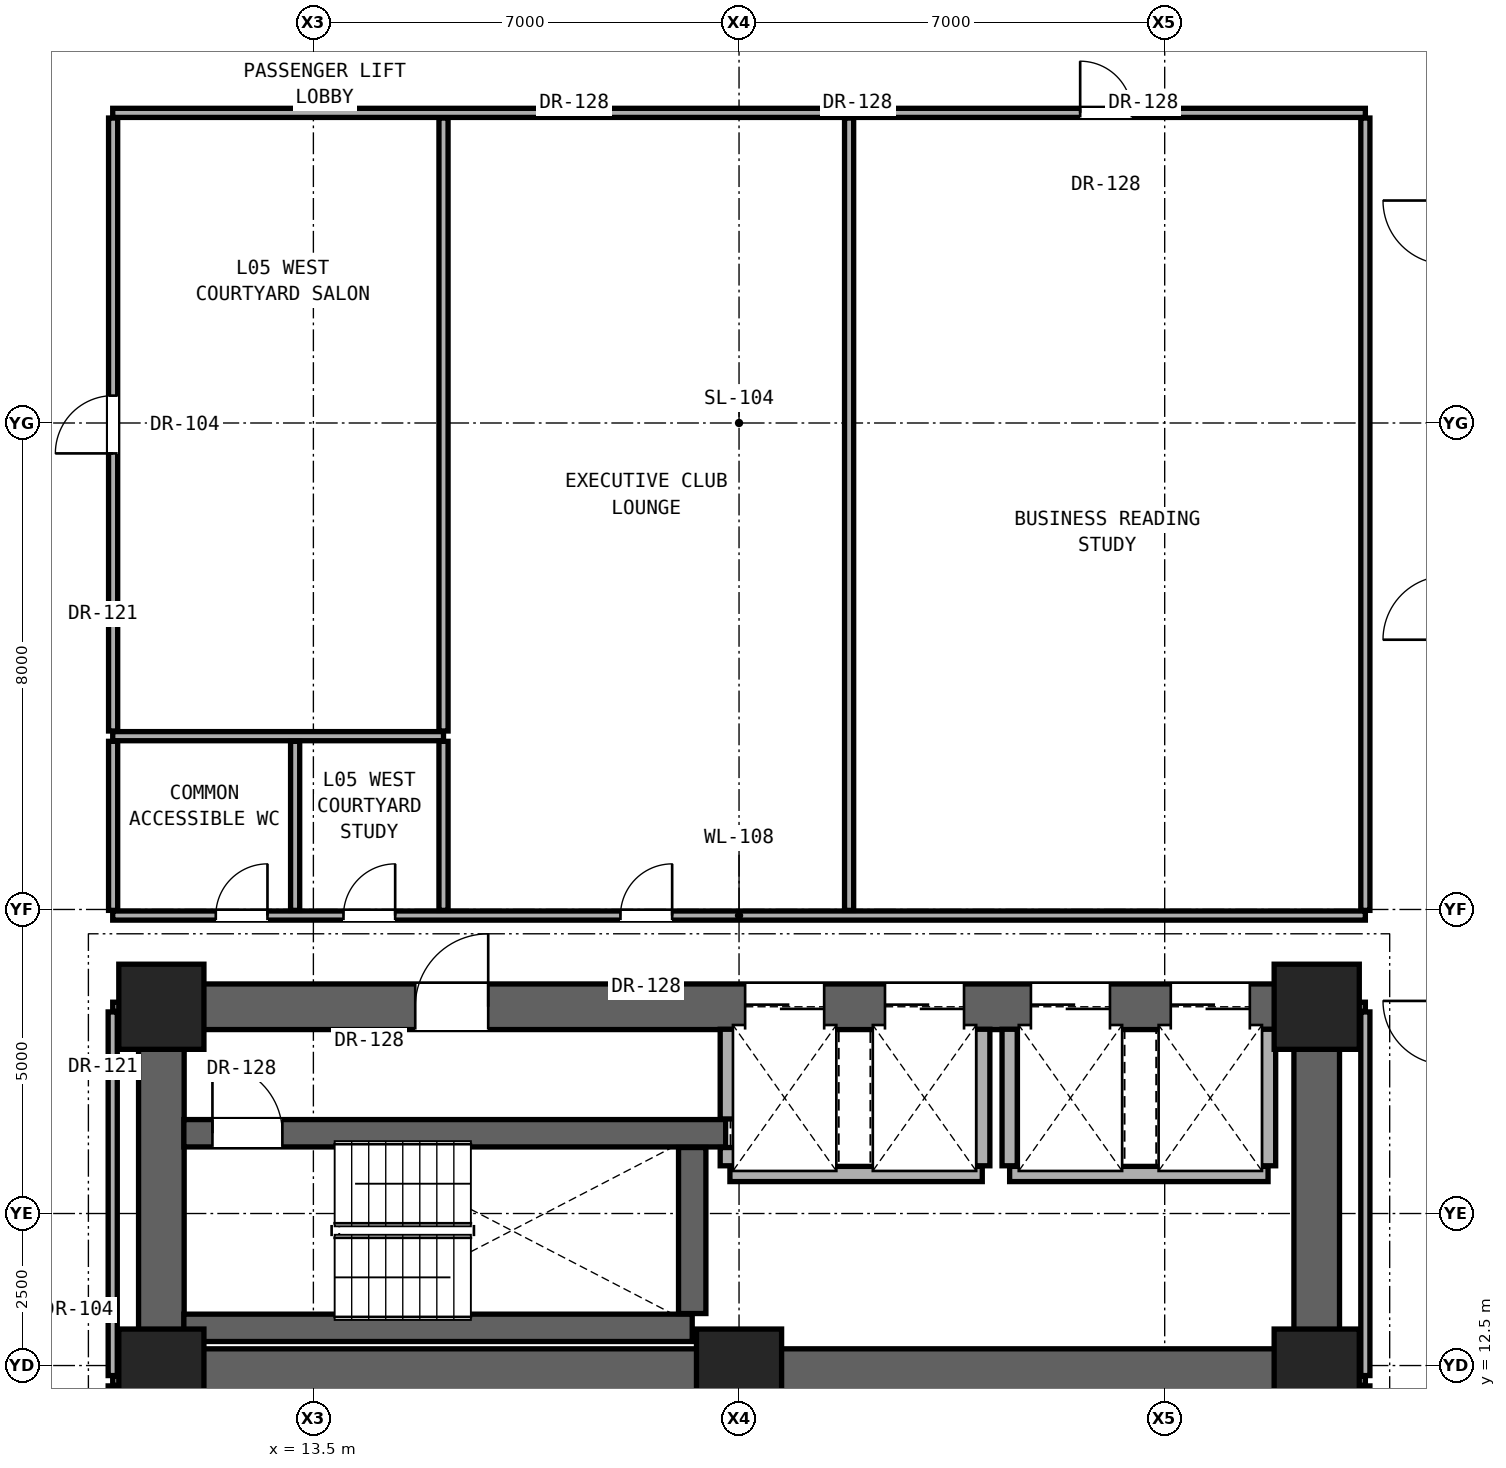
"""IFC4 building model, lengths in metres.
Left out: names, types, materials, properties, quantities, classifications, styles, units other than length and angle.
Written with IfcOpenShell. Run it as: python <this file> out.ifc"""

import sys

from ifc_helpers import new_model, si_unit, direction, frame, frame_2d, origin, origin_2d, place, context, subcontext, project, spatial, rectangle, extrude, element, fill, save


model = new_model("IFC4")
c1 = context("Model", 3, precision=1e-05, world=origin(), true_north=direction((0.0, 1.0)))
c2 = subcontext(c1, "Body", "Model", "MODEL_VIEW")
j1 = project(units=[si_unit("LENGTHUNIT", "METRE"), si_unit("PLANEANGLEUNIT", "RADIAN")], contexts=[c1])
p1 = place(None, origin())
s1 = spatial("IfcSite", under=j1, at=p1, CompositionType="ELEMENT")
p2 = place(p1, origin())
s2 = spatial("IfcBuilding", under=s1, at=p2, CompositionType="ELEMENT")
p3 = place(p2, frame((0.0, 0.0, 22.4)))
s3 = spatial("IfcBuildingStorey", under=s2, at=p3, CompositionType="ELEMENT", Elevation=22.4)
for number, where, z_axis, x_axis in (
    (1, (11.0, 12.4, 0.0), (0.0, 0.0, 1.0), (1.0, 0.0, 0.0)),
    (2, (20.5, 12.4, 0.0), (0.0, 0.0, 1.0), (1.0, 0.0, 0.0)),
    (3, (30.0, 12.4, 0.0), (0.0, 0.0, 1.0), (1.0, 0.0, 0.0)),
    (4, (11.0, 18.4, 0.0), (0.0, 0.0, 1.0), (1.0, 0.0, 0.0)),
    (5, (30.0, 18.4, 0.0), (0.0, 0.0, 1.0), (1.0, 0.0, 0.0)),
):
    element("IfcColumn", number, at=place(p3, frame(where, z_axis=z_axis, x_axis=x_axis)), inside=s3, PredefinedType="COLUMN", context=c2, shape_type="SweptSolid", body=[
        extrude(rectangle(XDim=1.4, YDim=1.4, at=origin_2d()), origin(), (0.0, 0.0, 1.0), 3.3),
    ])
p4 = place(p3, frame((11.0, 12.4, 0.0), z_axis=(0.0, 0.0, 1.0), x_axis=(1.0, 0.0, 0.0)))
e6 = element("IfcWall", 6, at=p4, inside=s3, PredefinedType="SHEAR", context=c2, shape_type="SweptSolid", body=[
    extrude(rectangle(XDim=19.0, YDim=0.75, at=frame_2d((9.5, 0.0))), origin(), (0.0, 0.0, 1.0), 3.06),
])
for number, where, z_axis, x_axis in (
    (7, (11.0, 12.4, 0.0), (0.0, 0.0, 1.0), (0.0, 1.0, 0.0)),
    (8, (30.0, 12.4, 0.0), (0.0, 0.0, 1.0), (0.0, 1.0, 0.0)),
):
    element("IfcWall", number, at=place(p3, frame(where, z_axis=z_axis, x_axis=x_axis)), inside=s3, PredefinedType="SHEAR", context=c2, shape_type="SweptSolid", body=[
        extrude(rectangle(XDim=6.0, YDim=0.75, at=frame_2d((3.0, 0.0))), origin(), (0.0, 0.0, 1.0), 3.06),
    ])
p5 = place(p3, frame((11.0, 18.4, 0.0), z_axis=(0.0, 0.0, 1.0), x_axis=(1.0, 0.0, 0.0)))
e9 = element("IfcWall", 9, at=p5, inside=s3, PredefinedType="SHEAR", context=c2, shape_type="SweptSolid", body=[
    extrude(rectangle(XDim=19.0, YDim=0.75, at=frame_2d((9.5, 0.0))), origin(), (0.0, 0.0, 1.0), 3.06),
])
p6 = place(p5, frame((4.175, 0.0, 0.0)))
e10 = element("IfcOpeningElement", 10, at=p6, cuts=e9, PredefinedType="OPENING", context=c2, shape_type="SweptSolid", body=[
    extrude(rectangle(XDim=1.2, YDim=2.25, at=frame_2d((0.6, 1.125))), frame((0.0, 0.385, 0.0), z_axis=(0.0, -1.0, 0.0), x_axis=(1.0, 0.0, 0.0)), (0.0, 0.0, 1.0), 0.77),
])
p7 = place(p5, frame((9.6, 0.0, 0.0)))
e11 = element("IfcOpeningElement", 11, at=p7, cuts=e9, PredefinedType="OPENING", context=c2, shape_type="SweptSolid", body=[
    extrude(rectangle(XDim=1.3, YDim=2.3, at=frame_2d((0.65, 1.15))), frame((0.0, 0.385, 0.0), z_axis=(0.0, -1.0, 0.0), x_axis=(1.0, 0.0, 0.0)), (0.0, 0.0, 1.0), 0.77),
])
p8 = place(p5, frame((11.9, 0.0, 0.0)))
e12 = element("IfcOpeningElement", 12, at=p8, cuts=e9, PredefinedType="OPENING", context=c2, shape_type="SweptSolid", body=[
    extrude(rectangle(XDim=1.3, YDim=2.3, at=frame_2d((0.65, 1.15))), frame((0.0, 0.385, 0.0), z_axis=(0.0, -1.0, 0.0), x_axis=(1.0, 0.0, 0.0)), (0.0, 0.0, 1.0), 0.77),
])
p9 = place(p5, frame((14.3, 0.0, 0.0)))
e13 = element("IfcOpeningElement", 13, at=p9, cuts=e9, PredefinedType="OPENING", context=c2, shape_type="SweptSolid", body=[
    extrude(rectangle(XDim=1.3, YDim=2.3, at=frame_2d((0.65, 1.15))), frame((0.0, 0.385, 0.0), z_axis=(0.0, -1.0, 0.0), x_axis=(1.0, 0.0, 0.0)), (0.0, 0.0, 1.0), 0.77),
])
p10 = place(p5, frame((16.6, 0.0, 0.0)))
e14 = element("IfcOpeningElement", 14, at=p10, cuts=e9, PredefinedType="OPENING", context=c2, shape_type="SweptSolid", body=[
    extrude(rectangle(XDim=1.3, YDim=2.3, at=frame_2d((0.65, 1.15))), frame((0.0, 0.385, 0.0), z_axis=(0.0, -1.0, 0.0), x_axis=(1.0, 0.0, 0.0)), (0.0, 0.0, 1.0), 0.77),
])
for number, where, z_axis, x_axis in (
    (15, (10.2, 12.25, 0.0), (0.0, 0.0, 1.0), (1.0, 0.0, 0.0)),
    (16, (30.37, 12.25, 0.0), (0.0, 0.0, 1.0), (1.0, 0.0, 0.0)),
):
    element("IfcWall", number, at=place(p3, frame(where, z_axis=z_axis, x_axis=x_axis)), inside=s3, PredefinedType="PARTITIONING", context=c2, shape_type="SweptSolid", body=[
        extrude(rectangle(XDim=0.43, YDim=0.15, at=frame_2d((0.215, 0.0))), origin(), (0.0, 0.0, 1.0), 3.06),
    ])
p11 = place(p3, frame((11.37, 13.12, 0.0), z_axis=(0.0, 0.0, 1.0), x_axis=(1.0, 0.0, 0.0)))
e17 = element("IfcWall", 17, at=p11, inside=s3, PredefinedType="SHEAR", context=c2, shape_type="SweptSolid", body=[
    extrude(rectangle(XDim=8.36, YDim=0.45, at=frame_2d((4.18, 0.0))), origin(), (0.0, 0.0, 1.0), 3.06),
])
p12 = place(p3, frame((20.35, 15.65, 0.0), z_axis=(0.0, 0.0, 1.0), x_axis=(1.0, 0.0, 0.0)))
e18 = element("IfcWall", 18, at=p12, inside=s3, PredefinedType="SOLIDWALL", context=c2, shape_type="SweptSolid", body=[
    extrude(rectangle(XDim=4.15, YDim=0.25, at=frame_2d((2.075, 0.0))), origin(), (0.0, 0.0, 1.0), 3.06),
])
p13 = place(p3, frame((24.95, 15.65, 0.0), z_axis=(0.0, 0.0, 1.0), x_axis=(1.0, 0.0, 0.0)))
e19 = element("IfcWall", 19, at=p13, inside=s3, PredefinedType="SOLIDWALL", context=c2, shape_type="SweptSolid", body=[
    extrude(rectangle(XDim=4.25, YDim=0.25, at=frame_2d((2.125, 0.0))), origin(), (0.0, 0.0, 1.0), 3.06),
])
p14 = place(p3, frame((11.37, 16.32, 0.0), z_axis=(0.0, 0.0, 1.0), x_axis=(1.0, 0.0, 0.0)))
e20 = element("IfcWall", 20, at=p14, inside=s3, PredefinedType="SHEAR", context=c2, shape_type="SweptSolid", body=[
    extrude(rectangle(XDim=8.91, YDim=0.45, at=frame_2d((4.455, 0.0))), origin(), (0.0, 0.0, 1.0), 3.06),
])
p15 = place(p14, frame((0.47, 0.0, 0.0)))
e21 = element("IfcOpeningElement", 21, at=p15, cuts=e20, PredefinedType="OPENING", context=c2, shape_type="SweptSolid", body=[
    extrude(rectangle(XDim=1.15, YDim=2.2, at=frame_2d((0.575, 1.1))), frame((0.0, 0.235, 0.0), z_axis=(0.0, -1.0, 0.0), x_axis=(1.0, 0.0, 0.0)), (0.0, 0.0, 1.0), 0.47),
])
for number, where, z_axis, x_axis in (
    (22, (10.2, 18.4, 0.0), (0.0, 0.0, 1.0), (1.0, 0.0, 0.0)),
    (23, (30.37, 18.4, 0.0), (0.0, 0.0, 1.0), (1.0, 0.0, 0.0)),
):
    element("IfcWall", number, at=place(p3, frame(where, z_axis=z_axis, x_axis=x_axis)), inside=s3, PredefinedType="PARTITIONING", context=c2, shape_type="SweptSolid", body=[
        extrude(rectangle(XDim=0.43, YDim=0.15, at=frame_2d((0.215, 0.0))), origin(), (0.0, 0.0, 1.0), 2.436),
    ])
p16 = place(p3, frame((10.2, 19.9, 0.0), z_axis=(0.0, 0.0, 1.0), x_axis=(1.0, 0.0, 0.0)))
e24 = element("IfcWall", 24, at=p16, inside=s3, PredefinedType="PARTITIONING", context=c2, shape_type="SweptSolid", body=[
    extrude(rectangle(XDim=20.6, YDim=0.15, at=frame_2d((10.3, 0.0))), origin(), (0.0, 0.0, 1.0), 2.104),
])
p17 = place(p16, frame((1.695, 0.0, 0.0)))
e25 = element("IfcOpeningElement", 25, at=p17, cuts=e24, PredefinedType="OPENING", context=c2, shape_type="SweptSolid", body=[
    extrude(rectangle(XDim=0.85, YDim=2.01, at=frame_2d((0.425, 1.005))), frame((0.0, 0.085, 0.0), z_axis=(0.0, -1.0, 0.0), x_axis=(1.0, 0.0, 0.0)), (0.0, 0.0, 1.0), 0.17),
])
p18 = place(p16, frame((3.795, 0.0, 0.0)))
e26 = element("IfcOpeningElement", 26, at=p18, cuts=e24, PredefinedType="OPENING", context=c2, shape_type="SweptSolid", body=[
    extrude(rectangle(XDim=0.85, YDim=2.01, at=frame_2d((0.425, 1.005))), frame((0.0, 0.085, 0.0), z_axis=(0.0, -1.0, 0.0), x_axis=(1.0, 0.0, 0.0)), (0.0, 0.0, 1.0), 0.17),
])
p19 = place(p16, frame((8.35, 0.0, 0.0)))
e27 = element("IfcOpeningElement", 27, at=p19, cuts=e24, PredefinedType="OPENING", context=c2, shape_type="SweptSolid", body=[
    extrude(rectangle(XDim=0.85, YDim=2.01, at=frame_2d((0.425, 1.005))), frame((0.0, 0.085, 0.0), z_axis=(0.0, -1.0, 0.0), x_axis=(1.0, 0.0, 0.0)), (0.0, 0.0, 1.0), 0.17),
])
p20 = place(p3, frame((10.2, 22.85, 0.0), z_axis=(0.0, 0.0, 1.0), x_axis=(1.0, 0.0, 0.0)))
e28 = element("IfcWall", 28, at=p20, inside=s3, PredefinedType="PARTITIONING", context=c2, shape_type="SweptSolid", body=[
    extrude(rectangle(XDim=5.44, YDim=0.15, at=frame_2d((2.72, 0.0))), origin(), (0.0, 0.0, 1.0), 2.104),
])
p21 = place(p3, frame((10.2, 33.1, 0.0), z_axis=(0.0, 0.0, 1.0), x_axis=(1.0, 0.0, 0.0)))
e29 = element("IfcWall", 29, at=p21, inside=s3, PredefinedType="PARTITIONING", context=c2, shape_type="SweptSolid", body=[
    extrude(rectangle(XDim=20.6, YDim=0.15, at=frame_2d((10.3, 0.0))), origin(), (0.0, 0.0, 1.0), 2.104),
])
p22 = place(p21, frame((15.91, 0.0, 0.0)))
e30 = element("IfcOpeningElement", 30, at=p22, cuts=e29, PredefinedType="OPENING", context=c2, shape_type="SweptSolid", body=[
    extrude(rectangle(XDim=0.85, YDim=2.01, at=frame_2d((0.425, 1.005))), frame((0.0, 0.085, 0.0), z_axis=(0.0, -1.0, 0.0), x_axis=(1.0, 0.0, 0.0)), (0.0, 0.0, 1.0), 0.17),
])
p23 = place(p3, frame((10.2, 9.02, 0.0), z_axis=(0.0, 0.0, 1.0), x_axis=(0.0, 1.0, 0.0)))
e31 = element("IfcWall", 31, at=p23, inside=s3, PredefinedType="PARTITIONING", context=c2, shape_type="SweptSolid", body=[
    extrude(rectangle(XDim=3.145, YDim=0.15, at=frame_2d((1.573, 0.0))), origin(), (0.0, 0.0, 1.0), 3.06),
])
p24 = place(p23, frame((1.048, 0.0, 0.0)))
e32 = element("IfcOpeningElement", 32, at=p24, cuts=e31, PredefinedType="OPENING", context=c2, shape_type="SweptSolid", body=[
    extrude(rectangle(XDim=1.05, YDim=2.2, at=frame_2d((0.525, 1.1))), frame((0.0, 0.085, 0.0), z_axis=(0.0, -1.0, 0.0), x_axis=(1.0, 0.0, 0.0)), (0.0, 0.0, 1.0), 0.17),
])
p25 = place(p3, frame((10.2, 12.335, 0.0), z_axis=(0.0, 0.0, 1.0), x_axis=(0.0, 1.0, 0.0)))
e33 = element("IfcWall", 33, at=p25, inside=s3, PredefinedType="PARTITIONING", context=c2, shape_type="SweptSolid", body=[
    extrude(rectangle(XDim=5.98, YDim=0.15, at=frame_2d((2.99, 0.0))), origin(), (0.0, 0.0, 1.0), 2.436),
])
p26 = place(p3, frame((10.207, 19.985, 0.0), z_axis=(0.0, 0.0, 1.0), x_axis=(0.0, 1.0, 0.0)))
e34 = element("IfcWall", 34, at=p26, inside=s3, PredefinedType="PARTITIONING", context=c2, shape_type="SweptSolid", body=[
    extrude(rectangle(XDim=2.78, YDim=0.15, at=frame_2d((1.39, 0.0))), origin(), (0.0, 0.0, 1.0), 3.06),
])
p27 = place(p3, frame((10.207, 22.935, 0.0), z_axis=(0.0, 0.0, 1.0), x_axis=(0.0, 1.0, 0.0)))
e35 = element("IfcWall", 35, at=p27, inside=s3, PredefinedType="PARTITIONING", context=c2, shape_type="SweptSolid", body=[
    extrude(rectangle(XDim=10.08, YDim=0.15, at=frame_2d((5.04, 0.0))), origin(), (0.0, 0.0, 1.0), 2.279),
])
p28 = place(p27, frame((4.565, 0.0, 0.0)))
e36 = element("IfcOpeningElement", 36, at=p28, cuts=e35, PredefinedType="OPENING", context=c2, shape_type="SweptSolid", body=[
    extrude(rectangle(XDim=0.95, YDim=2.15, at=frame_2d((0.475, 1.075))), frame((0.0, 0.085, 0.0), z_axis=(0.0, -1.0, 0.0), x_axis=(1.0, 0.0, 0.0)), (0.0, 0.0, 1.0), 0.17),
])
p29 = place(p3, frame((13.2, 19.985, 0.0), z_axis=(0.0, 0.0, 1.0), x_axis=(0.0, 1.0, 0.0)))
e37 = element("IfcWall", 37, at=p29, inside=s3, PredefinedType="PARTITIONING", context=c2, shape_type="SweptSolid", body=[
    extrude(rectangle(XDim=2.78, YDim=0.15, at=frame_2d((1.39, 0.0))), origin(), (0.0, 0.0, 1.0), 3.06),
])
p30 = place(p3, frame((15.64, 19.985, 0.0), z_axis=(0.0, 0.0, 1.0), x_axis=(0.0, 1.0, 0.0)))
e38 = element("IfcWall", 38, at=p30, inside=s3, PredefinedType="PARTITIONING", context=c2, shape_type="SweptSolid", body=[
    extrude(rectangle(XDim=2.78, YDim=0.15, at=frame_2d((1.39, 0.0))), origin(), (0.0, 0.0, 1.0), 2.589),
])
p31 = place(p3, frame((15.64, 22.935, 0.0), z_axis=(0.0, 0.0, 1.0), x_axis=(0.0, 1.0, 0.0)))
e39 = element("IfcWall", 39, at=p31, inside=s3, PredefinedType="PARTITIONING", context=c2, shape_type="SweptSolid", body=[
    extrude(rectangle(XDim=10.08, YDim=0.15, at=frame_2d((5.04, 0.0))), origin(), (0.0, 0.0, 1.0), 2.104),
])
p32 = place(p3, frame((19.73, 13.355, 0.0), z_axis=(0.0, 0.0, 1.0), x_axis=(0.0, 1.0, 0.0)))
e40 = element("IfcWall", 40, at=p32, inside=s3, PredefinedType="SHEAR", context=c2, shape_type="SweptSolid", body=[
    extrude(rectangle(XDim=2.73, YDim=0.45, at=frame_2d((1.365, 0.0))), origin(), (0.0, 0.0, 1.0), 3.06),
])
p33 = place(p3, frame((20.315, 15.785, 0.0), z_axis=(0.0, 0.0, 1.0), x_axis=(0.0, 1.0, 0.0)))
e41 = element("IfcWall", 41, at=p33, inside=s3, PredefinedType="SOLIDWALL", context=c2, shape_type="SweptSolid", body=[
    extrude(rectangle(XDim=0.3, YDim=0.25, at=frame_2d((0.15, 0.0))), origin(), (0.0, 0.0, 1.0), 3.06),
])
p34 = place(p3, frame((20.315, 16.555, 0.0), z_axis=(0.0, 0.0, 1.0), x_axis=(0.0, 1.0, 0.0)))
e42 = element("IfcWall", 42, at=p34, inside=s3, PredefinedType="SOLIDWALL", context=c2, shape_type="SweptSolid", body=[
    extrude(rectangle(XDim=1.475, YDim=0.25, at=frame_2d((0.738, 0.0))), origin(), (0.0, 0.0, 1.0), 3.06),
])
p35 = place(p3, frame((22.31, 19.985, 0.0), z_axis=(0.0, 0.0, 1.0), x_axis=(0.0, 1.0, 0.0)))
e43 = element("IfcWall", 43, at=p35, inside=s3, PredefinedType="PARTITIONING", context=c2, shape_type="SweptSolid", body=[
    extrude(rectangle(XDim=13.03, YDim=0.15, at=frame_2d((6.515, 0.0))), origin(), (0.0, 0.0, 1.0), 2.104),
])
for number, where, z_axis, x_axis in (
    (44, (24.5, 15.785, 0.0), (0.0, 0.0, 1.0), (0.0, 1.0, 0.0)),
    (45, (24.95, 15.785, 0.0), (0.0, 0.0, 1.0), (0.0, 1.0, 0.0)),
    (46, (29.2, 15.785, 0.0), (0.0, 0.0, 1.0), (0.0, 1.0, 0.0)),
):
    element("IfcWall", number, at=place(p3, frame(where, z_axis=z_axis, x_axis=x_axis)), inside=s3, PredefinedType="SOLIDWALL", context=c2, shape_type="SweptSolid", body=[
        extrude(rectangle(XDim=2.245, YDim=0.25, at=frame_2d((1.123, 0.0))), origin(), (0.0, 0.0, 1.0), 3.06),
    ])
p36 = place(p3, frame((30.8, 9.02, 0.0), z_axis=(0.0, 0.0, 1.0), x_axis=(0.0, 1.0, 0.0)))
e47 = element("IfcWall", 47, at=p36, inside=s3, PredefinedType="PARTITIONING", context=c2, shape_type="SweptSolid", body=[
    extrude(rectangle(XDim=3.145, YDim=0.15, at=frame_2d((1.573, 0.0))), origin(), (0.0, 0.0, 1.0), 3.06),
])
p37 = place(p36, frame((1.048, 0.0, 0.0)))
e48 = element("IfcOpeningElement", 48, at=p37, cuts=e47, PredefinedType="OPENING", context=c2, shape_type="SweptSolid", body=[
    extrude(rectangle(XDim=1.05, YDim=2.2, at=frame_2d((0.525, 1.1))), frame((0.0, 0.085, 0.0), z_axis=(0.0, -1.0, 0.0), x_axis=(1.0, 0.0, 0.0)), (0.0, 0.0, 1.0), 0.17),
])
p38 = place(p3, frame((30.8, 12.335, 0.0), z_axis=(0.0, 0.0, 1.0), x_axis=(0.0, 1.0, 0.0)))
e49 = element("IfcWall", 49, at=p38, inside=s3, PredefinedType="PARTITIONING", context=c2, shape_type="SweptSolid", body=[
    extrude(rectangle(XDim=5.98, YDim=0.15, at=frame_2d((2.99, 0.0))), origin(), (0.0, 0.0, 1.0), 2.436),
])
p39 = place(p3, frame((30.8, 19.985, 0.0), z_axis=(0.0, 0.0, 1.0), x_axis=(0.0, 1.0, 0.0)))
e50 = element("IfcWall", 50, at=p39, inside=s3, PredefinedType="PARTITIONING", context=c2, shape_type="SweptSolid", body=[
    extrude(rectangle(XDim=13.03, YDim=0.15, at=frame_2d((6.515, 0.0))), origin(), (0.0, 0.0, 1.0), 2.279),
])
p40 = place(p6, origin())
e51 = element("IfcDoor", 51, at=p40, inside=s3, OperationType="SINGLE_SWING_RIGHT", PredefinedType="DOOR", context=c2, shape_type="SweptSolid", body=[
    extrude(rectangle(XDim=1.2, YDim=2.25, at=frame_2d((0.6, 1.125))), frame((0.0, 0.025, 0.0), z_axis=(0.0, -1.0, 0.0), x_axis=(1.0, 0.0, 0.0)), (0.0, 0.0, 1.0), 0.05),
])
fill(e10, e51)
p41 = place(p15, origin())
e52 = element("IfcDoor", 52, at=p41, inside=s3, OperationType="SINGLE_SWING_LEFT", PredefinedType="DOOR", context=c2, shape_type="SweptSolid", body=[
    extrude(rectangle(XDim=1.15, YDim=2.2, at=frame_2d((0.575, 1.1))), frame((0.0, 0.025, 0.0), z_axis=(0.0, -1.0, 0.0), x_axis=(1.0, 0.0, 0.0)), (0.0, 0.0, 1.0), 0.05),
])
fill(e21, e52)
p42 = place(p17, origin())
e53 = element("IfcDoor", 53, at=p42, inside=s3, OperationType="SINGLE_SWING_RIGHT", PredefinedType="DOOR", context=c2, shape_type="SweptSolid", body=[
    extrude(rectangle(XDim=0.85, YDim=2.01, at=frame_2d((0.425, 1.005))), frame((0.0, 0.025, 0.0), z_axis=(0.0, -1.0, 0.0), x_axis=(1.0, 0.0, 0.0)), (0.0, 0.0, 1.0), 0.05),
])
fill(e25, e53)
p43 = place(p18, origin())
e54 = element("IfcDoor", 54, at=p43, inside=s3, OperationType="SINGLE_SWING_RIGHT", PredefinedType="DOOR", context=c2, shape_type="SweptSolid", body=[
    extrude(rectangle(XDim=0.85, YDim=2.01, at=frame_2d((0.425, 1.005))), frame((0.0, 0.025, 0.0), z_axis=(0.0, -1.0, 0.0), x_axis=(1.0, 0.0, 0.0)), (0.0, 0.0, 1.0), 0.05),
])
fill(e26, e54)
p44 = place(p28, origin())
e55 = element("IfcDoor", 55, at=p44, inside=s3, OperationType="SINGLE_SWING_LEFT", PredefinedType="DOOR", context=c2, shape_type="SweptSolid", body=[
    extrude(rectangle(XDim=0.95, YDim=2.15, at=frame_2d((0.475, 1.075))), frame((0.0, 0.025, 0.0), z_axis=(0.0, -1.0, 0.0), x_axis=(1.0, 0.0, 0.0)), (0.0, 0.0, 1.0), 0.05),
])
fill(e36, e55)
p45 = place(p19, origin())
e56 = element("IfcDoor", 56, at=p45, inside=s3, OperationType="SINGLE_SWING_RIGHT", PredefinedType="DOOR", context=c2, shape_type="SweptSolid", body=[
    extrude(rectangle(XDim=0.85, YDim=2.01, at=frame_2d((0.425, 1.005))), frame((0.0, 0.025, 0.0), z_axis=(0.0, -1.0, 0.0), x_axis=(1.0, 0.0, 0.0)), (0.0, 0.0, 1.0), 0.05),
])
fill(e27, e56)
p46 = place(p22, origin())
e57 = element("IfcDoor", 57, at=p46, inside=s3, OperationType="SINGLE_SWING_LEFT", PredefinedType="DOOR", context=c2, shape_type="SweptSolid", body=[
    extrude(rectangle(XDim=0.85, YDim=2.01, at=frame_2d((0.425, 1.005))), frame((0.0, 0.025, 0.0), z_axis=(0.0, -1.0, 0.0), x_axis=(1.0, 0.0, 0.0)), (0.0, 0.0, 1.0), 0.05),
])
fill(e30, e57)
p47 = place(p7, origin())
e58 = element("IfcDoor", 58, at=p47, inside=s3, OperationType="DOUBLE_DOOR_SLIDING", PredefinedType="DOOR", context=c2, shape_type="SweptSolid", body=[
    extrude(rectangle(XDim=1.3, YDim=2.3, at=frame_2d((0.65, 1.15))), frame((0.0, 0.025, 0.0), z_axis=(0.0, -1.0, 0.0), x_axis=(1.0, 0.0, 0.0)), (0.0, 0.0, 1.0), 0.05),
])
fill(e11, e58)
p48 = place(p8, origin())
e59 = element("IfcDoor", 59, at=p48, inside=s3, OperationType="DOUBLE_DOOR_SLIDING", PredefinedType="DOOR", context=c2, shape_type="SweptSolid", body=[
    extrude(rectangle(XDim=1.3, YDim=2.3, at=frame_2d((0.65, 1.15))), frame((0.0, 0.025, 0.0), z_axis=(0.0, -1.0, 0.0), x_axis=(1.0, 0.0, 0.0)), (0.0, 0.0, 1.0), 0.05),
])
fill(e12, e59)
p49 = place(p9, origin())
e60 = element("IfcDoor", 60, at=p49, inside=s3, OperationType="DOUBLE_DOOR_SLIDING", PredefinedType="DOOR", context=c2, shape_type="SweptSolid", body=[
    extrude(rectangle(XDim=1.3, YDim=2.3, at=frame_2d((0.65, 1.15))), frame((0.0, 0.025, 0.0), z_axis=(0.0, -1.0, 0.0), x_axis=(1.0, 0.0, 0.0)), (0.0, 0.0, 1.0), 0.05),
])
fill(e13, e60)
p50 = place(p10, origin())
e61 = element("IfcDoor", 61, at=p50, inside=s3, OperationType="DOUBLE_DOOR_SLIDING", PredefinedType="DOOR", context=c2, shape_type="SweptSolid", body=[
    extrude(rectangle(XDim=1.3, YDim=2.3, at=frame_2d((0.65, 1.15))), frame((0.0, 0.025, 0.0), z_axis=(0.0, -1.0, 0.0), x_axis=(1.0, 0.0, 0.0)), (0.0, 0.0, 1.0), 0.05),
])
fill(e14, e61)
save(model, sys.argv[1])
